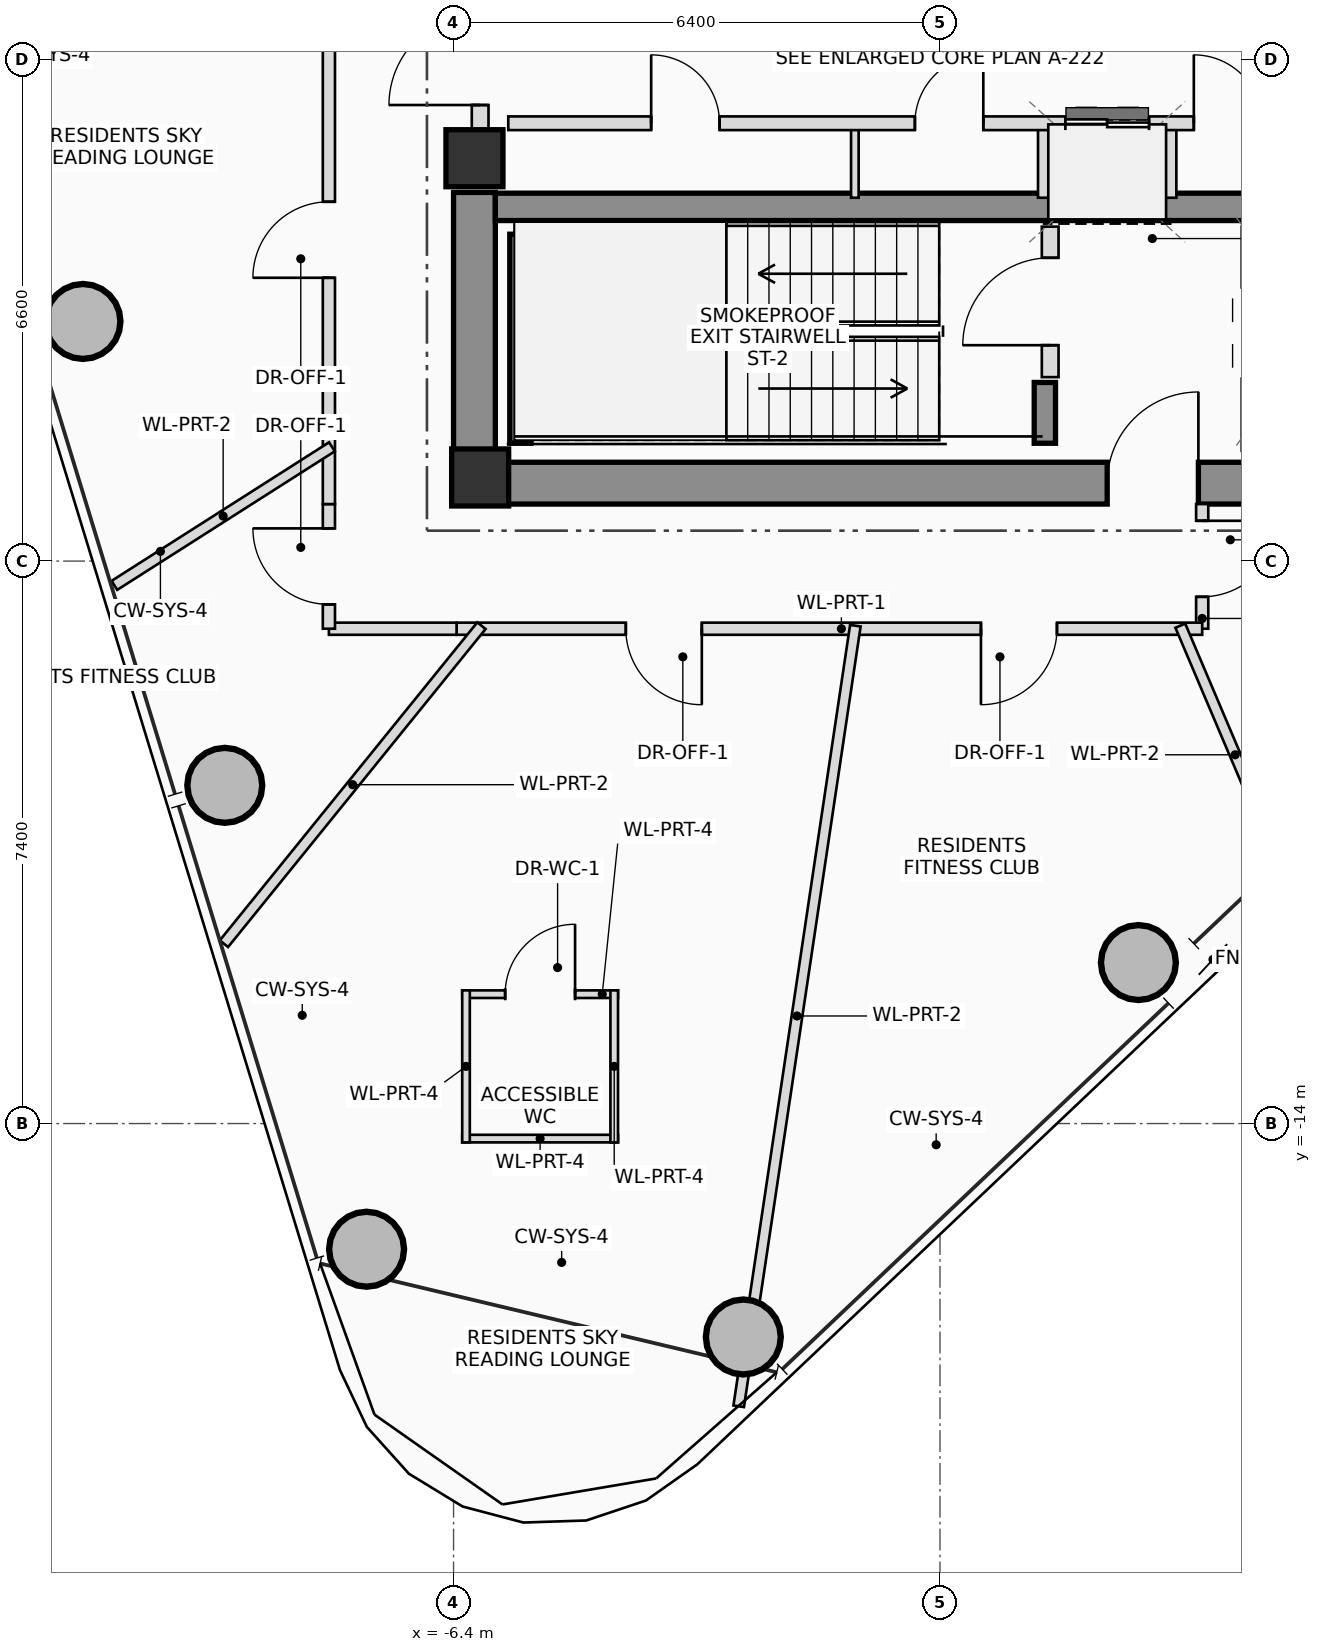
"""IFC4 building model, lengths in metres.
Left out: names, types, materials, properties, quantities, classifications, styles, units other than length and angle.
Written with IfcOpenShell. Run it as: python <this file> out.ifc"""

import sys

from ifc_helpers import new_model, si_unit, direction, frame, frame_2d, origin, origin_2d, place, context, subcontext, project, spatial, rectangle, hollow_circle, extrude, source, transform, mapped, element, fill, save


model = new_model("IFC4")
c1 = context("Model", 3, precision=1e-05, world=origin(), true_north=direction((0.0, 1.0)))
c2 = subcontext(c1, "Body", "Model", "MODEL_VIEW")
j1 = project(units=[si_unit("LENGTHUNIT", "METRE"), si_unit("PLANEANGLEUNIT", "RADIAN")], contexts=[c1])
p1 = place(None, origin())
s1 = spatial("IfcSite", under=j1, at=p1, CompositionType="ELEMENT")
p2 = place(p1, origin())
s2 = spatial("IfcBuilding", under=s1, at=p2, CompositionType="ELEMENT")
p3 = place(p2, frame((0.0, 0.0, 235.45)))
s3 = spatial("IfcBuildingStorey", under=s2, at=p3, CompositionType="ELEMENT", Elevation=235.45)
m1 = source(origin(), c2, "Body", "SweptSolid", [
    extrude(rectangle(XDim=0.75, YDim=0.75, at=origin_2d()), origin(), (0.0, 0.0, 1.0), 3.4),
])
p4 = place(p3, frame((-6.05, -5.5, 0.0), z_axis=(0.0, 0.0, 1.0), x_axis=(1.0, 0.0, 0.0)))
e1 = element("IfcColumn", 1, at=p4, inside=s3, PredefinedType="COLUMN", context=c2, shape_type="MappedRepresentation", body=[
    mapped(m1, transform((0.0, 0.0, 0.0), scale=1.0)),
])
p5 = place(p3, frame((-6.4, -5.575, 0.0), z_axis=(0.0, 0.0, 1.0), x_axis=(1.0, 0.0, 0.0)))
e2 = element("IfcWall", 2, at=p5, inside=s3, PredefinedType="SHEAR", context=c2, shape_type="SweptSolid", body=[
    extrude(rectangle(XDim=12.8, YDim=0.55, at=frame_2d((6.4, 0.0))), origin(), (0.0, 0.0, 1.0), 3.4),
])
p6 = place(p5, frame((8.6, 0.0, 0.0)))
e3 = element("IfcOpeningElement", 3, at=p6, cuts=e2, PredefinedType="OPENING", context=c2, shape_type="SweptSolid", body=[
    extrude(rectangle(XDim=1.2, YDim=2.2, at=frame_2d((0.6, 1.1))), frame((0.0, 0.285, 0.0), z_axis=(0.0, -1.0, 0.0), x_axis=(1.0, 0.0, 0.0)), (0.0, 0.0, 1.0), 0.57),
])
p7 = place(p3, frame((-6.125, -5.3, 0.0), z_axis=(0.0, 0.0, 1.0), x_axis=(0.0, 1.0, 0.0)))
e4 = element("IfcWall", 4, at=p7, inside=s3, PredefinedType="SHEAR", context=c2, shape_type="SweptSolid", body=[
    extrude(rectangle(XDim=3.55, YDim=0.55, at=frame_2d((1.775, 0.0))), origin(), (0.0, 0.0, 1.0), 3.4),
])
p8 = place(p3, frame((-5.85, -1.94, 0.0), z_axis=(0.0, 0.0, 1.0), x_axis=(1.0, 0.0, 0.0)))
e5 = element("IfcWall", 5, at=p8, inside=s3, PredefinedType="SHEAR", context=c2, shape_type="SweptSolid", body=[
    extrude(rectangle(XDim=11.7, YDim=0.36, at=frame_2d((5.85, 0.0))), origin(), (0.0, 0.0, 1.0), 3.4),
])
p9 = place(p3, frame((-5.52, -5.05, 0.0), z_axis=(0.0, 0.0, 1.0), x_axis=(0.0, 1.0, 0.0)))
e6 = element("IfcWall", 6, at=p9, inside=s3, PredefinedType="SHEAR", context=c2, shape_type="SweptSolid", body=[
    extrude(rectangle(XDim=2.75, YDim=0.28, at=frame_2d((1.375, 0.0))), origin(), (0.0, 0.0, 1.0), 3.4),
])
p10 = place(p3, frame((1.38, -5.05, 0.0), z_axis=(0.0, 0.0, 1.0), x_axis=(0.0, 1.0, 0.0)))
e7 = element("IfcWall", 7, at=p10, inside=s3, PredefinedType="SHEAR", context=c2, shape_type="SweptSolid", body=[
    extrude(rectangle(XDim=0.8, YDim=0.28, at=frame_2d((0.4, 0.0))), origin(), (0.0, 0.0, 1.0), 3.4),
])
p11 = place(p3, frame((-6.125, -1.3, 0.0), z_axis=(0.0, 0.0, 1.0), x_axis=(1.0, 0.0, 0.0)))
e8 = element("IfcColumn", 8, at=p11, inside=s3, PredefinedType="COLUMN", context=c2, shape_type="MappedRepresentation", body=[
    mapped(m1, transform((0.0, 0.0, 0.0), scale=1.0)),
])
m2 = source(origin(), c2, "Body", "SweptSolid", [
    extrude(hollow_circle(Radius=0.5, WallThickness=0.04, at=origin_2d()), origin(), (0.0, 0.0, 1.0), 3.4),
])
for number, where, z_axis, x_axis in (
    (9, (-2.587, -16.808, 0.0), (0.0, 0.0, 1.0), (1.0, 0.0, 0.0)),
    (10, (2.611, -11.882, 0.0), (0.0, 0.0, 1.0), (1.0, 0.0, 0.0)),
    (11, (-11.276, -3.448, 0.0), (0.0, 0.0, 1.0), (1.0, 0.0, 0.0)),
    (12, (-9.41, -9.55, 0.0), (0.0, 0.0, 1.0), (1.0, 0.0, 0.0)),
    (13, (-7.544, -15.653, 0.0), (0.0, 0.0, 1.0), (1.0, 0.0, 0.0)),
):
    element("IfcColumn", number, at=place(p3, frame(where, z_axis=z_axis, x_axis=x_axis)), inside=s3, PredefinedType="COLUMN", context=c2, shape_type="MappedRepresentation", body=[
        mapped(m2, transform((0.0, 0.0, 0.0), scale=1.0)),
    ])
p12 = place(p3, frame((-6.05, -0.95, 0.0), z_axis=(0.0, 0.0, 1.0), x_axis=(0.0, 1.0, 0.0)))
e14 = element("IfcWall", 14, at=p12, inside=s3, PredefinedType="PLUMBINGWALL", context=c2, shape_type="SweptSolid", body=[
    extrude(rectangle(XDim=1.9, YDim=0.22, at=frame_2d((0.95, 0.0))), origin(), (0.0, 0.0, 1.0), 2.18),
])
p13 = place(p12, frame((0.35, 0.0, 0.0)))
e15 = element("IfcOpeningElement", 15, at=p13, cuts=e14, PredefinedType="OPENING", context=c2, shape_type="SweptSolid", body=[
    extrude(rectangle(XDim=1.2, YDim=2.2, at=frame_2d((0.6, 1.1))), frame((0.0, 0.12, 0.0), z_axis=(0.0, -1.0, 0.0), x_axis=(1.0, 0.0, 0.0)), (0.0, 0.0, 1.0), 0.24),
])
p14 = place(p3, frame((1.45, -4.18, 0.0), z_axis=(0.0, 0.0, 1.0), x_axis=(0.0, 1.0, 0.0)))
e16 = element("IfcWall", 16, at=p14, inside=s3, PredefinedType="PLUMBINGWALL", context=c2, shape_type="SweptSolid", body=[
    extrude(rectangle(XDim=1.98, YDim=0.22, at=frame_2d((0.99, 0.0))), origin(), (0.0, 0.0, 1.0), 3.2),
])
p15 = place(p14, frame((0.42, 0.0, 0.0)))
e17 = element("IfcOpeningElement", 17, at=p15, cuts=e16, PredefinedType="OPENING", context=c2, shape_type="SweptSolid", body=[
    extrude(rectangle(XDim=1.15, YDim=2.15, at=frame_2d((0.575, 1.075))), frame((0.0, 0.12, 0.0), z_axis=(0.0, -1.0, 0.0), x_axis=(1.0, 0.0, 0.0)), (0.0, 0.0, 1.0), 0.24),
])
p16 = place(p3, frame((-1.12, -1.82, 0.0), z_axis=(0.0, 0.0, 1.0), x_axis=(0.0, 1.0, 0.0)))
e18 = element("IfcWall", 18, at=p16, inside=s3, PredefinedType="PARTITIONING", context=c2, shape_type="SweptSolid", body=[
    extrude(rectangle(XDim=0.98, YDim=0.1, at=frame_2d((0.49, 0.0))), origin(), (0.0, 0.0, 1.0), 3.2),
])
for number, where, z_axis, x_axis in (
    (19, (1.38, -1.82, 0.0), (0.0, 0.0, 1.0), (0.0, 1.0, 0.0)),
    (20, (3.02, -1.82, 0.0), (0.0, 0.0, 1.0), (0.0, 1.0, 0.0)),
):
    element("IfcWall", number, at=place(p3, frame(where, z_axis=z_axis, x_axis=x_axis)), inside=s3, PredefinedType="PLUMBINGWALL", context=c2, shape_type="SweptSolid", body=[
        extrude(rectangle(XDim=0.98, YDim=0.18, at=frame_2d((0.49, 0.0))), origin(), (0.0, 0.0, 1.0), 3.2),
    ])
p17 = place(p3, frame((-5.68, -0.84, 0.0), z_axis=(0.0, 0.0, 1.0), x_axis=(1.0, 0.0, 0.0)))
e21 = element("IfcWall", 21, at=p17, inside=s3, PredefinedType="PLUMBINGWALL", context=c2, shape_type="SweptSolid", body=[
    extrude(rectangle(XDim=10.22, YDim=0.18, at=frame_2d((5.11, 0.0))), origin(), (0.0, 0.0, 1.0), 3.2),
])
p18 = place(p17, frame((1.88, 0.0, 0.0)))
e22 = element("IfcOpeningElement", 22, at=p18, cuts=e21, PredefinedType="OPENING", context=c2, shape_type="SweptSolid", body=[
    extrude(rectangle(XDim=0.9, YDim=2.05, at=frame_2d((0.45, 1.025))), frame((0.0, 0.1, 0.0), z_axis=(0.0, -1.0, 0.0), x_axis=(1.0, 0.0, 0.0)), (0.0, 0.0, 1.0), 0.2),
])
p19 = place(p17, frame((5.35, 0.0, 0.0)))
e23 = element("IfcOpeningElement", 23, at=p19, cuts=e21, PredefinedType="OPENING", context=c2, shape_type="SweptSolid", body=[
    extrude(rectangle(XDim=0.9, YDim=2.05, at=frame_2d((0.45, 1.025))), frame((0.0, 0.1, 0.0), z_axis=(0.0, -1.0, 0.0), x_axis=(1.0, 0.0, 0.0)), (0.0, 0.0, 1.0), 0.2),
])
p20 = place(p17, frame((7.33, 0.0, 0.0)))
e24 = element("IfcOpeningElement", 24, at=p20, cuts=e21, PredefinedType="OPENING", context=c2, shape_type="SweptSolid", body=[
    extrude(rectangle(XDim=1.1, YDim=2.2, at=frame_2d((0.55, 1.1))), frame((0.0, 0.1, 0.0), z_axis=(0.0, -1.0, 0.0), x_axis=(1.0, 0.0, 0.0)), (0.0, 0.0, 1.0), 0.2),
])
p21 = place(p17, frame((9.02, 0.0, 0.0)))
e25 = element("IfcOpeningElement", 25, at=p21, cuts=e21, PredefinedType="OPENING", context=c2, shape_type="SweptSolid", body=[
    extrude(rectangle(XDim=0.9, YDim=2.05, at=frame_2d((0.45, 1.025))), frame((0.0, 0.1, 0.0), z_axis=(0.0, -1.0, 0.0), x_axis=(1.0, 0.0, 0.0)), (0.0, 0.0, 1.0), 0.2),
])
p22 = place(p3, frame((-6.286, -12.298, 0.0), z_axis=(0.0, 0.0, 1.0), x_axis=(1.0, 0.0, 0.0)))
e26 = element("IfcWall", 26, at=p22, inside=s3, PredefinedType="PARTITIONING", context=c2, shape_type="SweptSolid", body=[
    extrude(rectangle(XDim=2.05, YDim=0.1, at=frame_2d((1.025, 0.0))), origin(), (0.0, 0.0, 1.0), 3.2),
])
p23 = place(p22, frame((0.565, 0.0, 0.0)))
e27 = element("IfcOpeningElement", 27, at=p23, cuts=e26, PredefinedType="OPENING", context=c2, shape_type="SweptSolid", body=[
    extrude(rectangle(XDim=0.92, YDim=2.1, at=frame_2d((0.46, 1.05))), frame((0.0, 0.06, 0.0), z_axis=(0.0, -1.0, 0.0), x_axis=(1.0, 0.0, 0.0)), (0.0, 0.0, 1.0), 0.12),
])
p24 = place(p3, frame((-4.236, -14.198, 0.0), z_axis=(0.0, 0.0, 1.0), x_axis=(-1.0, 0.0, 0.0)))
e28 = element("IfcWall", 28, at=p24, inside=s3, PredefinedType="PARTITIONING", context=c2, shape_type="SweptSolid", body=[
    extrude(rectangle(XDim=2.05, YDim=0.1, at=frame_2d((1.025, 0.0))), origin(), (0.0, 0.0, 1.0), 3.2),
])
for number, where, z_axis, x_axis in (
    (29, (-4.286, -12.248, 0.0), (0.0, 0.0, 1.0), (0.0, -1.0, 0.0)),
    (30, (-6.236, -14.248, 0.0), (0.0, 0.0, 1.0), (0.0, 1.0, 0.0)),
):
    element("IfcWall", number, at=place(p3, frame(where, z_axis=z_axis, x_axis=x_axis)), inside=s3, PredefinedType="PARTITIONING", context=c2, shape_type="SweptSolid", body=[
        extrude(rectangle(XDim=2.0, YDim=0.1, at=frame_2d((1.0, 0.0))), origin(), (0.0, 0.0, 1.0), 2.855),
    ])
p25 = place(p3, frame((3.45, -5.85, 0.0), z_axis=(0.0, 0.0, 1.0), x_axis=(0.0, -1.0, 0.0)))
e31 = element("IfcWall", 31, at=p25, inside=s3, PredefinedType="PARTITIONING", context=c2, shape_type="SweptSolid", body=[
    extrude(rectangle(XDim=1.64, YDim=0.16, at=frame_2d((0.82, 0.0))), origin(), (0.0, 0.0, 1.0), 3.2),
])
p26 = place(p25, frame((0.22, 0.0, 0.0)))
e32 = element("IfcOpeningElement", 32, at=p26, cuts=e31, PredefinedType="OPENING", context=c2, shape_type="SweptSolid", body=[
    extrude(rectangle(XDim=1.0, YDim=2.25, at=frame_2d((0.5, 1.125))), frame((0.0, 0.09, 0.0), z_axis=(0.0, -1.0, 0.0), x_axis=(1.0, 0.0, 0.0)), (0.0, 0.0, 1.0), 0.18),
])
p27 = place(p3, frame((3.45, -7.49, 0.0), z_axis=(0.0, 0.0, 1.0), x_axis=(-1.0, 0.0, 0.0)))
e33 = element("IfcWall", 33, at=p27, inside=s3, PredefinedType="PARTITIONING", context=c2, shape_type="SweptSolid", body=[
    extrude(rectangle(XDim=9.81, YDim=0.16, at=frame_2d((4.905, 0.0))), origin(), (0.0, 0.0, 1.0), 2.605),
])
p28 = place(p27, frame((1.911, 0.0, 0.0)))
e34 = element("IfcOpeningElement", 34, at=p28, cuts=e33, PredefinedType="OPENING", context=c2, shape_type="SweptSolid", body=[
    extrude(rectangle(XDim=1.0, YDim=2.25, at=frame_2d((0.5, 1.125))), frame((0.0, 0.09, 0.0), z_axis=(0.0, -1.0, 0.0), x_axis=(1.0, 0.0, 0.0)), (0.0, 0.0, 1.0), 0.18),
])
p29 = place(p27, frame((6.583, 0.0, 0.0)))
e35 = element("IfcOpeningElement", 35, at=p29, cuts=e33, PredefinedType="OPENING", context=c2, shape_type="SweptSolid", body=[
    extrude(rectangle(XDim=1.0, YDim=2.25, at=frame_2d((0.5, 1.125))), frame((0.0, 0.09, 0.0), z_axis=(0.0, -1.0, 0.0), x_axis=(1.0, 0.0, 0.0)), (0.0, 0.0, 1.0), 0.18),
])
p30 = place(p3, frame((-6.36, -7.49, 0.0), z_axis=(0.0, 0.0, 1.0), x_axis=(-1.0, 0.0, 0.0)))
e36 = element("IfcWall", 36, at=p30, inside=s3, PredefinedType="PARTITIONING", context=c2, shape_type="SweptSolid", body=[
    extrude(rectangle(XDim=1.68, YDim=0.16, at=frame_2d((0.84, 0.0))), origin(), (0.0, 0.0, 1.0), 2.605),
])
p31 = place(p3, frame((-8.04, -7.49, 0.0), z_axis=(0.0, 0.0, 1.0), x_axis=(0.0, 1.0, 0.0)))
e37 = element("IfcWall", 37, at=p31, inside=s3, PredefinedType="PARTITIONING", context=c2, shape_type="SweptSolid", body=[
    extrude(rectangle(XDim=1.64, YDim=0.16, at=frame_2d((0.82, 0.0))), origin(), (0.0, 0.0, 1.0), 2.805),
])
p32 = place(p31, frame((0.32, 0.0, 0.0)))
e38 = element("IfcOpeningElement", 38, at=p32, cuts=e37, PredefinedType="OPENING", context=c2, shape_type="SweptSolid", body=[
    extrude(rectangle(XDim=1.0, YDim=2.25, at=frame_2d((0.5, 1.125))), frame((0.0, 0.09, 0.0), z_axis=(0.0, -1.0, 0.0), x_axis=(1.0, 0.0, 0.0)), (0.0, 0.0, 1.0), 0.18),
])
p33 = place(p3, frame((-8.04, -5.85, 0.0), z_axis=(0.0, 0.0, 1.0), x_axis=(0.0, 1.0, 0.0)))
e39 = element("IfcWall", 39, at=p33, inside=s3, PredefinedType="PARTITIONING", context=c2, shape_type="SweptSolid", body=[
    extrude(rectangle(XDim=11.7, YDim=0.16, at=frame_2d((5.85, 0.0))), origin(), (0.0, 0.0, 1.0), 2.605),
])
p34 = place(p33, frame((2.977, 0.0, 0.0)))
e40 = element("IfcOpeningElement", 40, at=p34, cuts=e39, PredefinedType="OPENING", context=c2, shape_type="SweptSolid", body=[
    extrude(rectangle(XDim=1.0, YDim=2.25, at=frame_2d((0.5, 1.125))), frame((0.0, 0.09, 0.0), z_axis=(0.0, -1.0, 0.0), x_axis=(1.0, 0.0, 0.0)), (0.0, 0.0, 1.0), 0.18),
])
p35 = place(p33, frame((6.919, 0.0, 0.0)))
e41 = element("IfcOpeningElement", 41, at=p35, cuts=e39, PredefinedType="OPENING", context=c2, shape_type="SweptSolid", body=[
    extrude(rectangle(XDim=1.0, YDim=2.25, at=frame_2d((0.5, 1.125))), frame((0.0, 0.09, 0.0), z_axis=(0.0, -1.0, 0.0), x_axis=(1.0, 0.0, 0.0)), (0.0, 0.0, 1.0), 0.18),
])
p36 = place(p3, frame((-8.0, -5.097, 0.0), z_axis=(0.0, 0.0, 1.0), x_axis=(-0.843391828446, -0.537299007733, 0.0)))
e42 = element("IfcWall", 42, at=p36, inside=s3, PredefinedType="PARTITIONING", context=c2, shape_type="SweptSolid", body=[
    extrude(rectangle(XDim=3.394, YDim=0.14, at=frame_2d((1.697, 0.0))), origin(), (0.0, 0.0, 1.0), 2.765),
])
p37 = place(p3, frame((-6.033, -7.45, 0.0), z_axis=(0.0, 0.0, 1.0), x_axis=(-0.629318234002, -0.777147708195, 0.0)))
e43 = element("IfcWall", 43, at=p37, inside=s3, PredefinedType="PARTITIONING", context=c2, shape_type="SweptSolid", body=[
    extrude(rectangle(XDim=5.384, YDim=0.14, at=frame_2d((2.692, 0.0))), origin(), (0.0, 0.0, 1.0), 2.605),
])
p38 = place(p3, frame((-1.113, -7.45, 0.0), z_axis=(0.0, 0.0, 1.0), x_axis=(-0.147817313856, -0.989014682259, 0.0)))
e44 = element("IfcWall", 44, at=p38, inside=s3, PredefinedType="PARTITIONING", context=c2, shape_type="SweptSolid", body=[
    extrude(rectangle(XDim=10.384, YDim=0.14, at=frame_2d((5.192, 0.0))), origin(), (0.0, 0.0, 1.0), 2.805),
])
p39 = place(p3, frame((3.162, -7.45, 0.0), z_axis=(0.0, 0.0, 1.0), x_axis=(0.39072313519, -0.920508246366, 0.0)))
e45 = element("IfcWall", 45, at=p39, inside=s3, PredefinedType="PARTITIONING", context=c2, shape_type="SweptSolid", body=[
    extrude(rectangle(XDim=3.69, YDim=0.14, at=frame_2d((1.845, 0.0))), origin(), (0.0, 0.0, 1.0), 2.605),
])
p40 = place(p6, origin())
e46 = element("IfcDoor", 46, at=p40, inside=s3, OperationType="SINGLE_SWING_RIGHT", PredefinedType="DOOR", context=c2, shape_type="SweptSolid", body=[
    extrude(rectangle(XDim=1.2, YDim=2.2, at=frame_2d((0.6, 1.1))), frame((0.0, 0.025, 0.0), z_axis=(0.0, -1.0, 0.0), x_axis=(1.0, 0.0, 0.0)), (0.0, 0.0, 1.0), 0.05),
])
fill(e3, e46)
p41 = place(p13, origin())
e47 = element("IfcDoor", 47, at=p41, inside=s3, OperationType="SINGLE_SWING_LEFT", PredefinedType="DOOR", context=c2, shape_type="SweptSolid", body=[
    extrude(rectangle(XDim=1.2, YDim=2.2, at=frame_2d((0.6, 1.1))), frame((0.0, 0.025, 0.0), z_axis=(0.0, -1.0, 0.0), x_axis=(1.0, 0.0, 0.0)), (0.0, 0.0, 1.0), 0.05),
])
fill(e15, e47)
p42 = place(p15, origin())
e48 = element("IfcDoor", 48, at=p42, inside=s3, OperationType="SINGLE_SWING_LEFT", PredefinedType="DOOR", context=c2, shape_type="SweptSolid", body=[
    extrude(rectangle(XDim=1.15, YDim=2.15, at=frame_2d((0.575, 1.075))), frame((0.0, 0.025, 0.0), z_axis=(0.0, -1.0, 0.0), x_axis=(1.0, 0.0, 0.0)), (0.0, 0.0, 1.0), 0.05),
])
fill(e17, e48)
p43 = place(p18, origin())
e49 = element("IfcDoor", 49, at=p43, inside=s3, OperationType="SINGLE_SWING_LEFT", PredefinedType="DOOR", context=c2, shape_type="SweptSolid", body=[
    extrude(rectangle(XDim=0.9, YDim=2.05, at=frame_2d((0.45, 1.025))), frame((0.0, 0.025, 0.0), z_axis=(0.0, -1.0, 0.0), x_axis=(1.0, 0.0, 0.0)), (0.0, 0.0, 1.0), 0.05),
])
fill(e22, e49)
p44 = place(p19, origin())
e50 = element("IfcDoor", 50, at=p44, inside=s3, OperationType="SINGLE_SWING_RIGHT", PredefinedType="DOOR", context=c2, shape_type="SweptSolid", body=[
    extrude(rectangle(XDim=0.9, YDim=2.05, at=frame_2d((0.45, 1.025))), frame((0.0, 0.025, 0.0), z_axis=(0.0, -1.0, 0.0), x_axis=(1.0, 0.0, 0.0)), (0.0, 0.0, 1.0), 0.05),
])
fill(e23, e50)
p45 = place(p20, origin())
e51 = element("IfcDoor", 51, at=p45, inside=s3, OperationType="DOUBLE_DOOR_SLIDING", PredefinedType="DOOR", context=c2, shape_type="SweptSolid", body=[
    extrude(rectangle(XDim=1.1, YDim=2.2, at=frame_2d((0.55, 1.1))), frame((0.0, 0.025, 0.0), z_axis=(0.0, -1.0, 0.0), x_axis=(1.0, 0.0, 0.0)), (0.0, 0.0, 1.0), 0.05),
])
fill(e24, e51)
p46 = place(p21, origin())
e52 = element("IfcDoor", 52, at=p46, inside=s3, OperationType="SINGLE_SWING_LEFT", PredefinedType="DOOR", context=c2, shape_type="SweptSolid", body=[
    extrude(rectangle(XDim=0.9, YDim=2.05, at=frame_2d((0.45, 1.025))), frame((0.0, 0.025, 0.0), z_axis=(0.0, -1.0, 0.0), x_axis=(1.0, 0.0, 0.0)), (0.0, 0.0, 1.0), 0.05),
])
fill(e25, e52)
p47 = place(p23, origin())
e53 = element("IfcDoor", 53, at=p47, inside=s3, OperationType="SINGLE_SWING_RIGHT", PredefinedType="DOOR", context=c2, shape_type="SweptSolid", body=[
    extrude(rectangle(XDim=0.92, YDim=2.1, at=frame_2d((0.46, 1.05))), frame((0.0, 0.025, 0.0), z_axis=(0.0, -1.0, 0.0), x_axis=(1.0, 0.0, 0.0)), (0.0, 0.0, 1.0), 0.05),
])
fill(e27, e53)
p48 = place(p26, origin())
e54 = element("IfcDoor", 54, at=p48, inside=s3, OperationType="SINGLE_SWING_LEFT", PredefinedType="DOOR", context=c2, shape_type="SweptSolid", body=[
    extrude(rectangle(XDim=1.0, YDim=2.25, at=frame_2d((0.5, 1.125))), frame((0.0, 0.025, 0.0), z_axis=(0.0, -1.0, 0.0), x_axis=(1.0, 0.0, 0.0)), (0.0, 0.0, 1.0), 0.05),
])
fill(e32, e54)
p49 = place(p28, origin())
e55 = element("IfcDoor", 55, at=p49, inside=s3, OperationType="SINGLE_SWING_RIGHT", PredefinedType="DOOR", context=c2, shape_type="SweptSolid", body=[
    extrude(rectangle(XDim=1.0, YDim=2.25, at=frame_2d((0.5, 1.125))), frame((0.0, 0.025, 0.0), z_axis=(0.0, -1.0, 0.0), x_axis=(1.0, 0.0, 0.0)), (0.0, 0.0, 1.0), 0.05),
])
fill(e34, e55)
p50 = place(p29, origin())
e56 = element("IfcDoor", 56, at=p50, inside=s3, OperationType="SINGLE_SWING_LEFT", PredefinedType="DOOR", context=c2, shape_type="SweptSolid", body=[
    extrude(rectangle(XDim=1.0, YDim=2.25, at=frame_2d((0.5, 1.125))), frame((0.0, 0.025, 0.0), z_axis=(0.0, -1.0, 0.0), x_axis=(1.0, 0.0, 0.0)), (0.0, 0.0, 1.0), 0.05),
])
fill(e35, e56)
p51 = place(p32, origin())
e57 = element("IfcDoor", 57, at=p51, inside=s3, OperationType="SINGLE_SWING_RIGHT", PredefinedType="DOOR", context=c2, shape_type="SweptSolid", body=[
    extrude(rectangle(XDim=1.0, YDim=2.25, at=frame_2d((0.5, 1.125))), frame((0.0, 0.025, 0.0), z_axis=(0.0, -1.0, 0.0), x_axis=(1.0, 0.0, 0.0)), (0.0, 0.0, 1.0), 0.05),
])
fill(e38, e57)
p52 = place(p34, origin())
e58 = element("IfcDoor", 58, at=p52, inside=s3, OperationType="SINGLE_SWING_LEFT", PredefinedType="DOOR", context=c2, shape_type="SweptSolid", body=[
    extrude(rectangle(XDim=1.0, YDim=2.25, at=frame_2d((0.5, 1.125))), frame((0.0, 0.025, 0.0), z_axis=(0.0, -1.0, 0.0), x_axis=(1.0, 0.0, 0.0)), (0.0, 0.0, 1.0), 0.05),
])
fill(e40, e58)
save(model, sys.argv[1])
